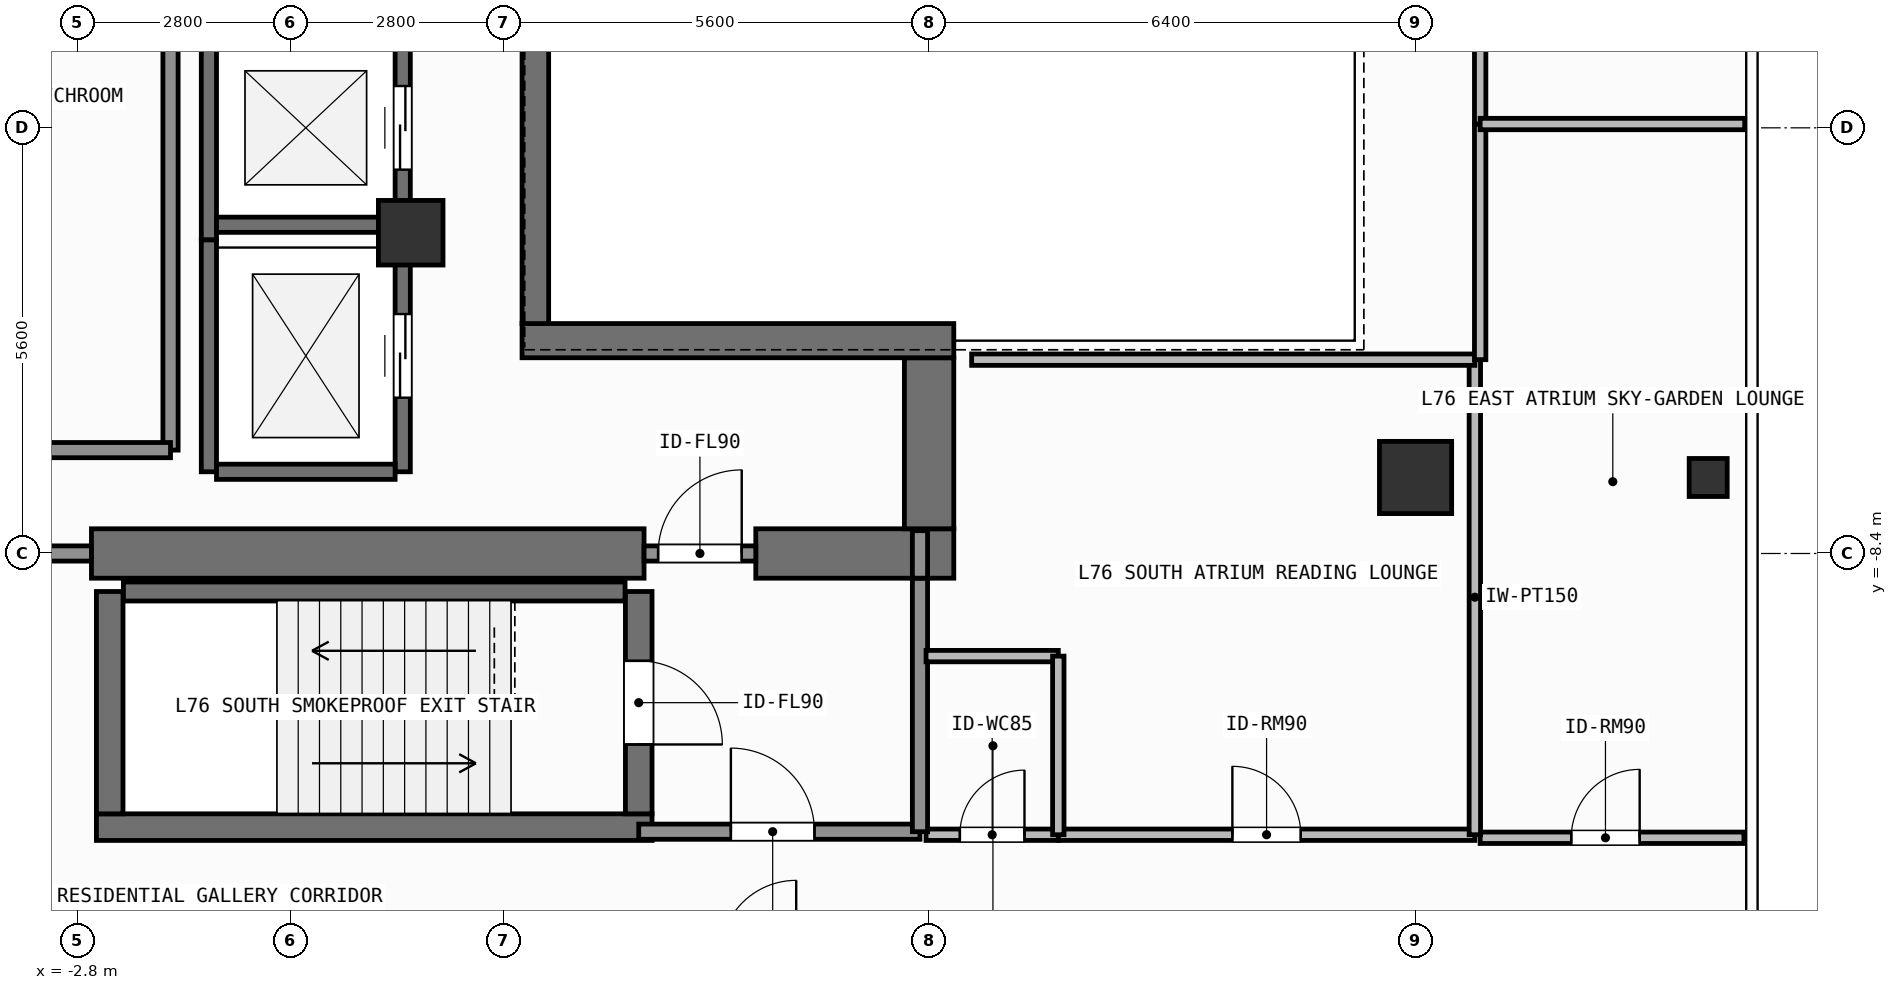
"""IFC4 building model, lengths in metres.
Left out: names, types, materials, properties, quantities, classifications, styles, units other than length and angle.
Written with IfcOpenShell. Run it as: python <this file> out.ifc"""

import sys

from ifc_helpers import new_model, si_unit, direction, frame, frame_2d, origin, origin_2d, place, context, subcontext, project, spatial, rectangle, hollow_rectangle, extrude, element, fill, save


model = new_model("IFC4")
c1 = context("Model", 3, precision=1e-05, world=origin(), true_north=direction((0.0, 1.0)))
c2 = subcontext(c1, "Body", "Model", "MODEL_VIEW")
j1 = project(units=[si_unit("LENGTHUNIT", "METRE"), si_unit("PLANEANGLEUNIT", "RADIAN")], contexts=[c1])
p1 = place(None, origin())
s1 = spatial("IfcSite", under=j1, at=p1, CompositionType="ELEMENT")
p2 = place(p1, origin())
s2 = spatial("IfcBuilding", under=s1, at=p2, CompositionType="ELEMENT")
p3 = place(p2, frame((0.0, 0.0, 309.3)))
s3 = spatial("IfcBuildingStorey", under=s2, at=p3, CompositionType="ELEMENT", Elevation=309.3)
p4 = place(p3, frame((-2.62, -8.4, 0.0), z_axis=(0.0, 0.0, 1.0), x_axis=(1.0, 0.0, 0.0)))
e1 = element("IfcWall", 1, at=p4, inside=s3, PredefinedType="SHEAR", context=c2, shape_type="SweptSolid", body=[
    extrude(rectangle(XDim=7.27, YDim=0.65, at=frame_2d((3.635, 0.0))), origin(), (0.0, 0.0, 1.0), 3.9),
])
p5 = place(p3, frame((6.12, -8.4, 0.0), z_axis=(0.0, 0.0, 1.0), x_axis=(1.0, 0.0, 0.0)))
e2 = element("IfcWall", 2, at=p5, inside=s3, PredefinedType="SHEAR", context=c2, shape_type="SweptSolid", body=[
    extrude(rectangle(XDim=2.605, YDim=0.65, at=frame_2d((1.302, 0.0))), origin(), (0.0, 0.0, 1.0), 3.9),
])
p6 = place(p3, frame((8.4, -8.075, 0.0), z_axis=(0.0, 0.0, 1.0), x_axis=(0.0, 1.0, 0.0)))
e3 = element("IfcWall", 3, at=p6, inside=s3, PredefinedType="SHEAR", context=c2, shape_type="SweptSolid", body=[
    extrude(rectangle(XDim=2.25, YDim=0.65, at=frame_2d((1.125, 0.0))), origin(), (0.0, 0.0, 1.0), 3.9),
])
p7 = place(p3, frame((3.045, -5.6, 0.0), z_axis=(0.0, 0.0, 1.0), x_axis=(1.0, 0.0, 0.0)))
e4 = element("IfcWall", 4, at=p7, inside=s3, PredefinedType="SHEAR", context=c2, shape_type="SweptSolid", body=[
    extrude(rectangle(XDim=5.68, YDim=0.45, at=frame_2d((2.84, 0.0))), origin(), (0.0, 0.0, 1.0), 3.9),
])
p8 = place(p3, frame((3.22, -5.375, 0.0), z_axis=(0.0, 0.0, 1.0), x_axis=(0.0, 1.0, 0.0)))
e5 = element("IfcWall", 5, at=p8, inside=s3, PredefinedType="SHEAR", context=c2, shape_type="SweptSolid", body=[
    extrude(rectangle(XDim=10.75, YDim=0.35, at=frame_2d((5.375, 0.0))), origin(), (0.0, 0.0, 1.0), 3.9),
])
p9 = place(p3, frame((-2.555, -12.0, 0.0), z_axis=(0.0, 0.0, 1.0), x_axis=(1.0, 0.0, 0.0)))
e6 = element("IfcWall", 6, at=p9, inside=s3, PredefinedType="SHEAR", context=c2, shape_type="SweptSolid", body=[
    extrude(rectangle(XDim=7.31, YDim=0.35, at=frame_2d((3.655, 0.0))), origin(), (0.0, 0.0, 1.0), 3.9),
])
p10 = place(p3, frame((-2.2, -8.9, 0.0), z_axis=(0.0, 0.0, 1.0), x_axis=(1.0, 0.0, 0.0)))
e7 = element("IfcWall", 7, at=p10, inside=s3, PredefinedType="SHEAR", context=c2, shape_type="SweptSolid", body=[
    extrude(rectangle(XDim=6.6, YDim=0.25, at=frame_2d((3.3, 0.0))), origin(), (0.0, 0.0, 1.0), 3.9),
])
p11 = place(p3, frame((-2.38, -11.825, 0.0), z_axis=(0.0, 0.0, 1.0), x_axis=(0.0, 1.0, 0.0)))
e8 = element("IfcWall", 8, at=p11, inside=s3, PredefinedType="SHEAR", context=c2, shape_type="SweptSolid", body=[
    extrude(rectangle(XDim=2.925, YDim=0.35, at=frame_2d((1.462, 0.0))), origin(), (0.0, 0.0, 1.0), 3.9),
])
p12 = place(p3, frame((4.58, -8.9, 0.0), z_axis=(0.0, 0.0, 1.0), x_axis=(0.0, -1.0, 0.0)))
e9 = element("IfcWall", 9, at=p12, inside=s3, PredefinedType="SHEAR", context=c2, shape_type="SweptSolid", body=[
    extrude(rectangle(XDim=2.925, YDim=0.35, at=frame_2d((1.462, 0.0))), origin(), (0.0, 0.0, 1.0), 3.9),
])
p13 = place(p12, frame((0.913, 0.0, 0.0)))
e10 = element("IfcOpeningElement", 10, at=p13, cuts=e9, PredefinedType="OPENING", context=c2, shape_type="SweptSolid", body=[
    extrude(rectangle(XDim=1.1, YDim=2.15, at=frame_2d((0.55, 1.075))), frame((0.0, 0.185, 0.0), z_axis=(0.0, -1.0, 0.0), x_axis=(1.0, 0.0, 0.0)), (0.0, 0.0, 1.0), 0.37),
])
p14 = place(p3, frame((14.8, -7.4, 0.0), z_axis=(0.0, 0.0, 1.0), x_axis=(1.0, 0.0, 0.0)))
e11 = element("IfcColumn", 11, at=p14, inside=s3, PredefinedType="COLUMN", context=c2, shape_type="SweptSolid", body=[
    extrude(rectangle(XDim=0.95, YDim=0.95, at=origin_2d()), origin(), (0.0, 0.0, 1.0), 3.9),
])
p15 = place(p3, frame((1.58, -4.18, 0.0), z_axis=(0.0, 0.0, 1.0), x_axis=(1.0, 0.0, 0.0)))
e12 = element("IfcColumn", 12, at=p15, inside=s3, PredefinedType="COLUMN", context=c2, shape_type="SweptSolid", body=[
    extrude(rectangle(XDim=0.85, YDim=0.85, at=origin_2d()), origin(), (0.0, 0.0, 1.0), 3.9),
])
p16 = place(p3, frame((18.65, -7.4, 0.0), z_axis=(0.0, 0.0, 1.0), x_axis=(1.0, 0.0, 0.0)))
e13 = element("IfcColumn", 13, at=p16, inside=s3, PredefinedType="COLUMN", context=c2, shape_type="SweptSolid", body=[
    extrude(hollow_rectangle(XDim=0.5, YDim=0.5, WallThickness=0.025, at=origin_2d()), origin(), (0.0, 0.0, 1.0), 3.9),
])
p17 = place(p3, frame((-1.075, -4.275, 0.0), z_axis=(0.0, 0.0, 1.0), x_axis=(0.0, 1.0, 0.0)))
e14 = element("IfcWall", 14, at=p17, inside=s3, PredefinedType="SHEAR", context=c2, shape_type="SweptSolid", body=[
    extrude(rectangle(XDim=2.75, YDim=0.2, at=frame_2d((1.375, 0.0))), origin(), (0.0, 0.0, 1.0), 3.64),
])
p18 = place(p3, frame((1.475, -4.275, 0.0), z_axis=(0.0, 0.0, 1.0), x_axis=(0.0, 1.0, 0.0)))
e15 = element("IfcWall", 15, at=p18, inside=s3, PredefinedType="SHEAR", context=c2, shape_type="SweptSolid", body=[
    extrude(rectangle(XDim=2.75, YDim=0.2, at=frame_2d((1.375, 0.0))), origin(), (0.0, 0.0, 1.0), 3.64),
])
p19 = place(p18, frame((0.925, 0.0, 0.0)))
e16 = element("IfcOpeningElement", 16, at=p19, cuts=e15, PredefinedType="OPENING", context=c2, shape_type="SweptSolid", body=[
    extrude(rectangle(XDim=1.1, YDim=2.2, at=frame_2d((0.55, 1.1))), frame((0.0, 0.11, 0.0), z_axis=(0.0, -1.0, 0.0), x_axis=(1.0, 0.0, 0.0)), (0.0, 0.0, 1.0), 0.22),
])
p20 = place(p3, frame((-0.975, -4.075, 0.0), z_axis=(0.0, 0.0, 1.0), x_axis=(1.0, 0.0, 0.0)))
e17 = element("IfcWall", 17, at=p20, inside=s3, PredefinedType="SHEAR", context=c2, shape_type="SweptSolid", body=[
    extrude(rectangle(XDim=2.35, YDim=0.2, at=frame_2d((1.175, 0.0))), origin(), (0.0, 0.0, 1.0), 3.64),
])
p21 = place(p3, frame((-1.075, -7.325, 0.0), z_axis=(0.0, 0.0, 1.0), x_axis=(0.0, 1.0, 0.0)))
e18 = element("IfcWall", 18, at=p21, inside=s3, PredefinedType="SHEAR", context=c2, shape_type="SweptSolid", body=[
    extrude(rectangle(XDim=3.05, YDim=0.2, at=frame_2d((1.525, 0.0))), origin(), (0.0, 0.0, 1.0), 3.64),
])
p22 = place(p3, frame((1.475, -7.325, 0.0), z_axis=(0.0, 0.0, 1.0), x_axis=(0.0, 1.0, 0.0)))
e19 = element("IfcWall", 19, at=p22, inside=s3, PredefinedType="SHEAR", context=c2, shape_type="SweptSolid", body=[
    extrude(rectangle(XDim=3.05, YDim=0.2, at=frame_2d((1.525, 0.0))), origin(), (0.0, 0.0, 1.0), 3.64),
])
p23 = place(p22, frame((0.975, 0.0, 0.0)))
e20 = element("IfcOpeningElement", 20, at=p23, cuts=e19, PredefinedType="OPENING", context=c2, shape_type="SweptSolid", body=[
    extrude(rectangle(XDim=1.1, YDim=2.2, at=frame_2d((0.55, 1.1))), frame((0.0, 0.11, 0.0), z_axis=(0.0, -1.0, 0.0), x_axis=(1.0, 0.0, 0.0)), (0.0, 0.0, 1.0), 0.22),
])
p24 = place(p3, frame((-0.975, -7.325, 0.0), z_axis=(0.0, 0.0, 1.0), x_axis=(1.0, 0.0, 0.0)))
e21 = element("IfcWall", 21, at=p24, inside=s3, PredefinedType="SHEAR", context=c2, shape_type="SweptSolid", body=[
    extrude(rectangle(XDim=2.35, YDim=0.2, at=frame_2d((1.175, 0.0))), origin(), (0.0, 0.0, 1.0), 3.64),
])
p25 = place(p3, frame((4.58, -12.06, 0.0), z_axis=(0.0, 0.0, 1.0), x_axis=(1.0, 0.0, 0.0)))
e22 = element("IfcWall", 22, at=p25, inside=s3, PredefinedType="SOLIDWALL", context=c2, shape_type="SweptSolid", body=[
    extrude(rectangle(XDim=3.7, YDim=0.2, at=frame_2d((1.85, 0.0))), origin(), (0.0, 0.0, 1.0), 3.64),
])
p26 = place(p25, frame((1.212, 0.0, 0.0)))
e23 = element("IfcOpeningElement", 23, at=p26, cuts=e22, PredefinedType="OPENING", context=c2, shape_type="SweptSolid", body=[
    extrude(rectangle(XDim=1.1, YDim=2.15, at=frame_2d((0.55, 1.075))), frame((0.0, 0.11, 0.0), z_axis=(0.0, -1.0, 0.0), x_axis=(1.0, 0.0, 0.0)), (0.0, 0.0, 1.0), 0.22),
])
p27 = place(p3, frame((4.65, -8.4, 0.0), z_axis=(0.0, 0.0, 1.0), x_axis=(1.0, 0.0, 0.0)))
e24 = element("IfcWall", 24, at=p27, inside=s3, PredefinedType="SOLIDWALL", context=c2, shape_type="SweptSolid", body=[
    extrude(rectangle(XDim=1.47, YDim=0.2, at=frame_2d((0.735, 0.0))), origin(), (0.0, 0.0, 1.0), 2.88),
])
p28 = place(p27, frame((0.185, 0.0, 0.0)))
e25 = element("IfcOpeningElement", 25, at=p28, cuts=e24, PredefinedType="OPENING", context=c2, shape_type="SweptSolid", body=[
    extrude(rectangle(XDim=1.1, YDim=2.15, at=frame_2d((0.55, 1.075))), frame((0.0, 0.11, 0.0), z_axis=(0.0, -1.0, 0.0), x_axis=(1.0, 0.0, 0.0)), (0.0, 0.0, 1.0), 0.22),
])
p29 = place(p3, frame((8.36, -12.1, 0.0), z_axis=(0.0, 0.0, 1.0), x_axis=(1.0, 0.0, 0.0)))
e26 = element("IfcWall", 26, at=p29, inside=s3, PredefinedType="PARTITIONING", context=c2, shape_type="SweptSolid", body=[
    extrude(rectangle(XDim=1.74, YDim=0.15, at=frame_2d((0.87, 0.0))), origin(), (0.0, 0.0, 1.0), 3.64),
])
p30 = place(p29, frame((0.445, 0.0, 0.0)))
e27 = element("IfcOpeningElement", 27, at=p30, cuts=e26, PredefinedType="OPENING", context=c2, shape_type="SweptSolid", body=[
    extrude(rectangle(XDim=0.85, YDim=2.1, at=frame_2d((0.425, 1.05))), frame((0.0, 0.085, 0.0), z_axis=(0.0, -1.0, 0.0), x_axis=(1.0, 0.0, 0.0)), (0.0, 0.0, 1.0), 0.17),
])
p31 = place(p3, frame((10.1, -12.1, 0.0), z_axis=(0.0, 0.0, 1.0), x_axis=(1.0, 0.0, 0.0)))
e28 = element("IfcWall", 28, at=p31, inside=s3, PredefinedType="PARTITIONING", context=c2, shape_type="SweptSolid", body=[
    extrude(rectangle(XDim=5.48, YDim=0.15, at=frame_2d((2.74, 0.0))), origin(), (0.0, 0.0, 1.0), 3.64),
])
p32 = place(p31, frame((2.29, 0.0, 0.0)))
e29 = element("IfcOpeningElement", 29, at=p32, cuts=e28, PredefinedType="OPENING", context=c2, shape_type="SweptSolid", body=[
    extrude(rectangle(XDim=0.9, YDim=2.1, at=frame_2d((0.45, 1.05))), frame((0.0, 0.085, 0.0), z_axis=(0.0, -1.0, 0.0), x_axis=(1.0, 0.0, 0.0)), (0.0, 0.0, 1.0), 0.17),
])
p33 = place(p3, frame((15.65, -12.14, 0.0), z_axis=(0.0, 0.0, 1.0), x_axis=(1.0, 0.0, 0.0)))
e30 = element("IfcWall", 30, at=p33, inside=s3, PredefinedType="PARTITIONING", context=c2, shape_type="SweptSolid", body=[
    extrude(rectangle(XDim=3.47, YDim=0.15, at=frame_2d((1.735, 0.0))), origin(), (0.0, 0.0, 1.0), 3.64),
])
p34 = place(p33, frame((1.198, 0.0, 0.0)))
e31 = element("IfcOpeningElement", 31, at=p34, cuts=e30, PredefinedType="OPENING", context=c2, shape_type="SweptSolid", body=[
    extrude(rectangle(XDim=0.9, YDim=2.1, at=frame_2d((0.45, 1.05))), frame((0.0, 0.085, 0.0), z_axis=(0.0, -1.0, 0.0), x_axis=(1.0, 0.0, 0.0)), (0.0, 0.0, 1.0), 0.17),
])
p35 = place(p3, frame((8.28, -12.06, 0.0), z_axis=(0.0, 0.0, 1.0), x_axis=(0.0, 1.0, 0.0)))
e32 = element("IfcWall", 32, at=p35, inside=s3, PredefinedType="SOLIDWALL", context=c2, shape_type="SweptSolid", body=[
    extrude(rectangle(XDim=3.335, YDim=0.2, at=frame_2d((1.667, 0.0))), origin(), (0.0, 0.0, 1.0), 3.64),
])
p36 = place(p3, frame((-4.2, -8.4, 0.0), z_axis=(0.0, 0.0, 1.0), x_axis=(1.0, 0.0, 0.0)))
e33 = element("IfcWall", 33, at=p36, inside=s3, PredefinedType="SOLIDWALL", context=c2, shape_type="SweptSolid", body=[
    extrude(rectangle(XDim=1.58, YDim=0.2, at=frame_2d((0.79, 0.0))), origin(), (0.0, 0.0, 1.0), 2.88),
])
p37 = place(p3, frame((-1.58, -7.04, 0.0), z_axis=(0.0, 0.0, 1.0), x_axis=(0.0, 1.0, 0.0)))
e34 = element("IfcWall", 34, at=p37, inside=s3, PredefinedType="SOLIDWALL", context=c2, shape_type="SweptSolid", body=[
    extrude(rectangle(XDim=5.7, YDim=0.2, at=frame_2d((2.85, 0.0))), origin(), (0.0, 0.0, 1.0), 3.64),
])
p38 = place(p3, frame((-7.38, -7.04, 0.0), z_axis=(0.0, 0.0, 1.0), x_axis=(1.0, 0.0, 0.0)))
e35 = element("IfcWall", 35, at=p38, inside=s3, PredefinedType="SOLIDWALL", context=c2, shape_type="SweptSolid", body=[
    extrude(rectangle(XDim=5.8, YDim=0.2, at=frame_2d((2.9, 0.0))), origin(), (0.0, 0.0, 1.0), 3.64),
])
p39 = place(p3, frame((8.28, -8.725, 0.0), z_axis=(0.0, 0.0, 1.0), x_axis=(0.0, 1.0, 0.0)))
e36 = element("IfcWall", 36, at=p39, inside=s3, PredefinedType="SOLIDWALL", context=c2, shape_type="SweptSolid", body=[
    extrude(rectangle(XDim=0.625, YDim=0.2, at=frame_2d((0.312, 0.0))), origin(), (0.0, 0.0, 1.0), 3.64),
])
p40 = place(p3, frame((8.36, -9.75, 0.0), z_axis=(0.0, 0.0, 1.0), x_axis=(1.0, 0.0, 0.0)))
e37 = element("IfcWall", 37, at=p40, inside=s3, PredefinedType="PARTITIONING", context=c2, shape_type="SweptSolid", body=[
    extrude(rectangle(XDim=1.74, YDim=0.15, at=frame_2d((0.87, 0.0))), origin(), (0.0, 0.0, 1.0), 3.64),
])
p41 = place(p3, frame((10.1, -12.1, 0.0), z_axis=(0.0, 0.0, 1.0), x_axis=(0.0, 1.0, 0.0)))
e38 = element("IfcWall", 38, at=p41, inside=s3, PredefinedType="PARTITIONING", context=c2, shape_type="SweptSolid", body=[
    extrude(rectangle(XDim=2.35, YDim=0.15, at=frame_2d((1.175, 0.0))), origin(), (0.0, 0.0, 1.0), 3.64),
])
p42 = place(p3, frame((15.58, -12.1, 0.0), z_axis=(0.0, 0.0, 1.0), x_axis=(0.0, 1.0, 0.0)))
e39 = element("IfcWall", 39, at=p42, inside=s3, PredefinedType="PARTITIONING", context=c2, shape_type="SweptSolid", body=[
    extrude(rectangle(XDim=6.25, YDim=0.15, at=frame_2d((3.125, 0.0))), origin(), (0.0, 0.0, 1.0), 3.33),
])
p43 = place(p3, frame((8.96, -5.85, 0.0), z_axis=(0.0, 0.0, 1.0), x_axis=(1.0, 0.0, 0.0)))
e40 = element("IfcWall", 40, at=p43, inside=s3, PredefinedType="PARTITIONING", context=c2, shape_type="SweptSolid", body=[
    extrude(rectangle(XDim=6.62, YDim=0.15, at=frame_2d((3.31, 0.0))), origin(), (0.0, 0.0, 1.0), 3.64),
])
p44 = place(p3, frame((15.65, -5.85, 0.0), z_axis=(0.0, 0.0, 1.0), x_axis=(0.0, 1.0, 0.0)))
e41 = element("IfcWall", 41, at=p44, inside=s3, PredefinedType="PARTITIONING", context=c2, shape_type="SweptSolid", body=[
    extrude(rectangle(XDim=3.1, YDim=0.15, at=frame_2d((1.55, 0.0))), origin(), (0.0, 0.0, 1.0), 3.33),
])
p45 = place(p3, frame((15.65, -2.75, 0.0), z_axis=(0.0, 0.0, 1.0), x_axis=(0.0, 1.0, 0.0)))
e42 = element("IfcWall", 42, at=p45, inside=s3, PredefinedType="PARTITIONING", context=c2, shape_type="SweptSolid", body=[
    extrude(rectangle(XDim=8.6, YDim=0.15, at=frame_2d((4.3, 0.0))), origin(), (0.0, 0.0, 1.0), 3.33),
])
p46 = place(p3, frame((15.65, -2.75, 0.0), z_axis=(0.0, 0.0, 1.0), x_axis=(1.0, 0.0, 0.0)))
e43 = element("IfcWall", 43, at=p46, inside=s3, PredefinedType="PARTITIONING", context=c2, shape_type="SweptSolid", body=[
    extrude(rectangle(XDim=3.48, YDim=0.15, at=frame_2d((1.74, 0.0))), origin(), (0.0, 0.0, 1.0), 3.64),
])
p47 = place(p19, origin())
e44 = element("IfcDoor", 44, at=p47, inside=s3, OperationType="SLIDING_TO_LEFT", PredefinedType="DOOR", context=c2, shape_type="SweptSolid", body=[
    extrude(rectangle(XDim=1.1, YDim=2.2, at=frame_2d((0.55, 1.1))), frame((0.0, 0.025, 0.0), z_axis=(0.0, -1.0, 0.0), x_axis=(1.0, 0.0, 0.0)), (0.0, 0.0, 1.0), 0.05),
])
fill(e16, e44)
p48 = place(p23, origin())
e45 = element("IfcDoor", 45, at=p48, inside=s3, OperationType="SLIDING_TO_LEFT", PredefinedType="DOOR", context=c2, shape_type="SweptSolid", body=[
    extrude(rectangle(XDim=1.1, YDim=2.2, at=frame_2d((0.55, 1.1))), frame((0.0, 0.025, 0.0), z_axis=(0.0, -1.0, 0.0), x_axis=(1.0, 0.0, 0.0)), (0.0, 0.0, 1.0), 0.05),
])
fill(e20, e45)
p49 = place(p13, origin())
e46 = element("IfcDoor", 46, at=p49, inside=s3, OperationType="SINGLE_SWING_RIGHT", PredefinedType="DOOR", context=c2, shape_type="SweptSolid", body=[
    extrude(rectangle(XDim=1.1, YDim=2.15, at=frame_2d((0.55, 1.075))), frame((0.0, 0.025, 0.0), z_axis=(0.0, -1.0, 0.0), x_axis=(1.0, 0.0, 0.0)), (0.0, 0.0, 1.0), 0.05),
])
fill(e10, e46)
p50 = place(p26, origin())
e47 = element("IfcDoor", 47, at=p50, inside=s3, OperationType="SINGLE_SWING_LEFT", PredefinedType="DOOR", context=c2, shape_type="SweptSolid", body=[
    extrude(rectangle(XDim=1.1, YDim=2.15, at=frame_2d((0.55, 1.075))), frame((0.0, 0.025, 0.0), z_axis=(0.0, -1.0, 0.0), x_axis=(1.0, 0.0, 0.0)), (0.0, 0.0, 1.0), 0.05),
])
fill(e23, e47)
p51 = place(p28, origin())
e48 = element("IfcDoor", 48, at=p51, inside=s3, OperationType="SINGLE_SWING_RIGHT", PredefinedType="DOOR", context=c2, shape_type="SweptSolid", body=[
    extrude(rectangle(XDim=1.1, YDim=2.15, at=frame_2d((0.55, 1.075))), frame((0.0, 0.025, 0.0), z_axis=(0.0, -1.0, 0.0), x_axis=(1.0, 0.0, 0.0)), (0.0, 0.0, 1.0), 0.05),
])
fill(e25, e48)
p52 = place(p30, origin())
e49 = element("IfcDoor", 49, at=p52, inside=s3, OperationType="SINGLE_SWING_RIGHT", PredefinedType="DOOR", context=c2, shape_type="SweptSolid", body=[
    extrude(rectangle(XDim=0.85, YDim=2.1, at=frame_2d((0.425, 1.05))), frame((0.0, 0.025, 0.0), z_axis=(0.0, -1.0, 0.0), x_axis=(1.0, 0.0, 0.0)), (0.0, 0.0, 1.0), 0.05),
])
fill(e27, e49)
p53 = place(p32, origin())
e50 = element("IfcDoor", 50, at=p53, inside=s3, OperationType="SINGLE_SWING_LEFT", PredefinedType="DOOR", context=c2, shape_type="SweptSolid", body=[
    extrude(rectangle(XDim=0.9, YDim=2.1, at=frame_2d((0.45, 1.05))), frame((0.0, 0.025, 0.0), z_axis=(0.0, -1.0, 0.0), x_axis=(1.0, 0.0, 0.0)), (0.0, 0.0, 1.0), 0.05),
])
fill(e29, e50)
p54 = place(p34, origin())
e51 = element("IfcDoor", 51, at=p54, inside=s3, OperationType="SINGLE_SWING_RIGHT", PredefinedType="DOOR", context=c2, shape_type="SweptSolid", body=[
    extrude(rectangle(XDim=0.9, YDim=2.1, at=frame_2d((0.45, 1.05))), frame((0.0, 0.025, 0.0), z_axis=(0.0, -1.0, 0.0), x_axis=(1.0, 0.0, 0.0)), (0.0, 0.0, 1.0), 0.05),
])
fill(e31, e51)
save(model, sys.argv[1])
